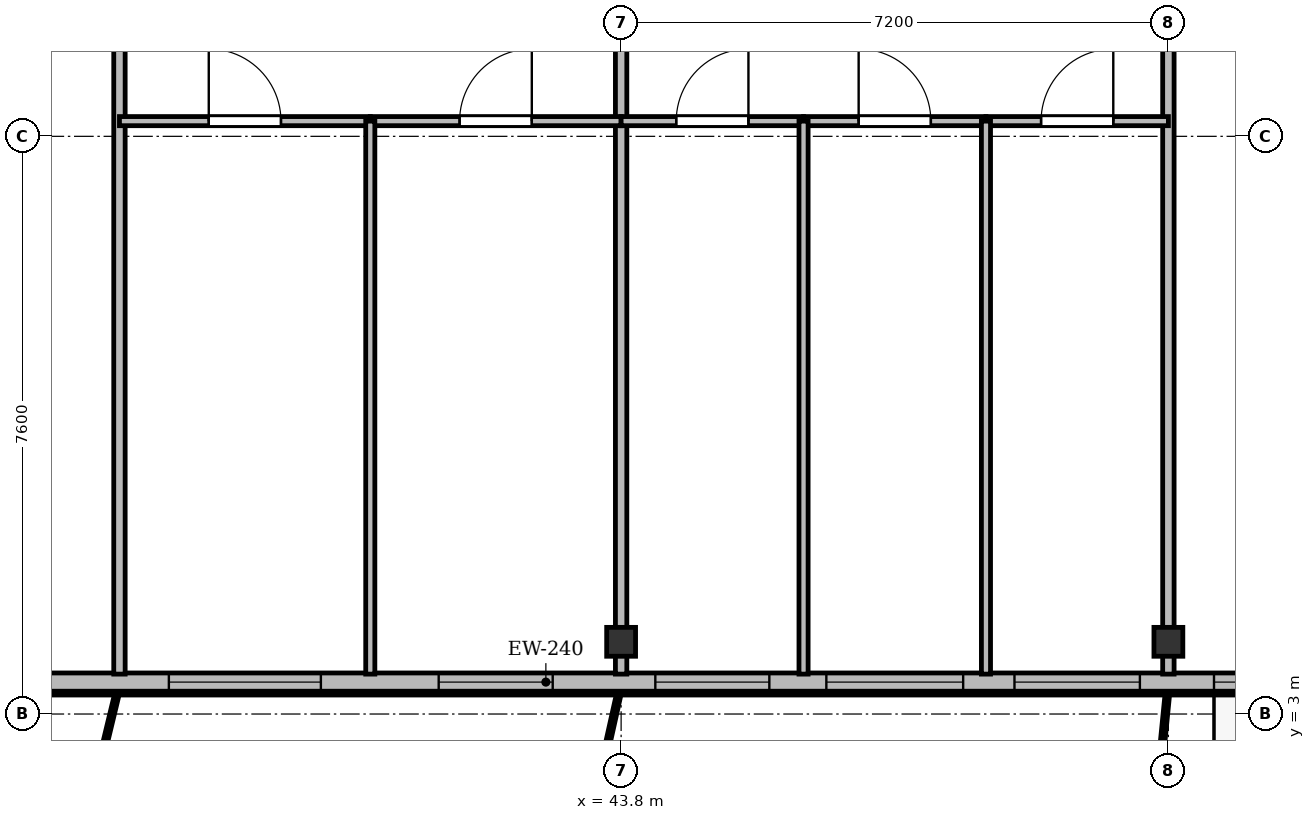
"""IFC4 building model, lengths in metres.
Left out: names, types, materials, properties, quantities, classifications, styles, units other than length and angle.
Written with IfcOpenShell. Run it as: python <this file> out.ifc"""

import sys

from ifc_helpers import new_model, si_unit, direction, frame, frame_2d, origin, origin_2d, place, context, subcontext, project, spatial, rectangle, i_section, extrude, source, transform, mapped, element, fill, save


model = new_model("IFC4")
c1 = context("Model", 3, precision=1e-05, world=origin(), true_north=direction((0.0, 1.0)))
c2 = subcontext(c1, "Body", "Model", "MODEL_VIEW")
j1 = project(units=[si_unit("LENGTHUNIT", "METRE"), si_unit("PLANEANGLEUNIT", "RADIAN")], contexts=[c1])
p1 = place(None, origin())
s1 = spatial("IfcSite", under=j1, at=p1, CompositionType="ELEMENT")
p2 = place(p1, origin())
s2 = spatial("IfcBuilding", under=s1, at=p2, CompositionType="ELEMENT")
p3 = place(p2, frame((0.0, 0.0, 132.1)))
s3 = spatial("IfcBuildingStorey", under=s2, at=p3, CompositionType="ELEMENT", Elevation=132.1)
m1 = source(origin(), c2, "Body", "SweptSolid", [
    extrude(i_section(OverallWidth=0.38, OverallDepth=0.38, WebThickness=0.02, FlangeThickness=0.03, at=origin_2d()), origin(), (0.0, 0.0, 1.0), 3.6),
])
for number, where, z_axis, x_axis in (
    (1, (43.8, 3.95, 0.0), (0.0, 0.0, 1.0), (1.0, 0.0, 0.0)),
    (2, (51.0, 3.95, 0.0), (0.0, 0.0, 1.0), (1.0, 0.0, 0.0)),
):
    element("IfcColumn", number, at=place(p3, frame(where, z_axis=z_axis, x_axis=x_axis)), inside=s3, PredefinedType="COLUMN", context=c2, shape_type="MappedRepresentation", body=[
        mapped(m1, transform((0.0, 0.0, 0.0), x_axis=(1.0, 0.0, 0.0), y_axis=(0.0, 1.0, 0.0), z_axis=(0.0, 0.0, 1.0), scale=1.0)),
    ])
p4 = place(p3, frame((63.6, 3.42, 0.0), z_axis=(0.0, 0.0, 1.0), x_axis=(-1.0, 0.0, 0.0)))
e3 = element("IfcWall", 3, at=p4, inside=s3, PredefinedType="SOLIDWALL", context=c2, shape_type="SweptSolid", body=[
    extrude(rectangle(XDim=52.8, YDim=0.24, at=frame_2d((26.4, 0.0))), origin(), (0.0, 0.0, 1.0), 3.35),
])
p5 = place(p4, frame((0.42, 0.0, 0.9)))
e4 = element("IfcOpeningElement", 4, at=p5, cuts=e3, PredefinedType="OPENING", context=c2, shape_type="SweptSolid", body=[
    extrude(rectangle(XDim=1.65, YDim=1.85, at=frame_2d((0.825, 0.925))), frame((0.0, 0.13, 0.0), z_axis=(0.0, -1.0, 0.0), x_axis=(1.0, 0.0, 0.0)), (0.0, 0.0, 1.0), 0.26),
])
p6 = place(p4, frame((2.75, 0.0, 0.9)))
e5 = element("IfcOpeningElement", 5, at=p6, cuts=e3, PredefinedType="OPENING", context=c2, shape_type="SweptSolid", body=[
    extrude(rectangle(XDim=1.8, YDim=1.8, at=frame_2d((0.9, 0.9))), frame((0.0, 0.13, 0.0), z_axis=(0.0, -1.0, 0.0), x_axis=(1.0, 0.0, 0.0)), (0.0, 0.0, 1.0), 0.26),
])
p7 = place(p4, frame((5.902, 0.0, 0.0)))
e6 = element("IfcOpeningElement", 6, at=p7, cuts=e3, PredefinedType="OPENING", context=c2, shape_type="SweptSolid", body=[
    extrude(rectangle(XDim=1.2, YDim=2.2, at=frame_2d((0.6, 1.1))), frame((0.0, 0.13, 0.0), z_axis=(0.0, -1.0, 0.0), x_axis=(1.0, 0.0, 0.0)), (0.0, 0.0, 1.0), 0.26),
])
p8 = place(p4, frame((7.65, 0.0, 0.9)))
e7 = element("IfcOpeningElement", 7, at=p8, cuts=e3, PredefinedType="OPENING", context=c2, shape_type="SweptSolid", body=[
    extrude(rectangle(XDim=1.5, YDim=1.75, at=frame_2d((0.75, 0.875))), frame((0.0, 0.13, 0.0), z_axis=(0.0, -1.0, 0.0), x_axis=(1.0, 0.0, 0.0)), (0.0, 0.0, 1.0), 0.26),
])
p9 = place(p4, frame((10.0, 0.0, 0.9)))
e8 = element("IfcOpeningElement", 8, at=p9, cuts=e3, PredefinedType="OPENING", context=c2, shape_type="SweptSolid", body=[
    extrude(rectangle(XDim=2.0, YDim=1.95, at=frame_2d((1.0, 0.975))), frame((0.0, 0.13, 0.0), z_axis=(0.0, -1.0, 0.0), x_axis=(1.0, 0.0, 0.0)), (0.0, 0.0, 1.0), 0.26),
])
p10 = place(p4, frame((12.975, 0.0, 0.9)))
e9 = element("IfcOpeningElement", 9, at=p10, cuts=e3, PredefinedType="OPENING", context=c2, shape_type="SweptSolid", body=[
    extrude(rectangle(XDim=1.65, YDim=1.85, at=frame_2d((0.825, 0.925))), frame((0.0, 0.13, 0.0), z_axis=(0.0, -1.0, 0.0), x_axis=(1.0, 0.0, 0.0)), (0.0, 0.0, 1.0), 0.26),
])
p11 = place(p4, frame((15.3, 0.0, 0.9)))
e10 = element("IfcOpeningElement", 10, at=p11, cuts=e3, PredefinedType="OPENING", context=c2, shape_type="SweptSolid", body=[
    extrude(rectangle(XDim=1.8, YDim=1.8, at=frame_2d((0.9, 0.9))), frame((0.0, 0.13, 0.0), z_axis=(0.0, -1.0, 0.0), x_axis=(1.0, 0.0, 0.0)), (0.0, 0.0, 1.0), 0.26),
])
p12 = place(p4, frame((17.85, 0.0, 0.9)))
e11 = element("IfcOpeningElement", 11, at=p12, cuts=e3, PredefinedType="OPENING", context=c2, shape_type="SweptSolid", body=[
    extrude(rectangle(XDim=1.5, YDim=1.75, at=frame_2d((0.75, 0.875))), frame((0.0, 0.13, 0.0), z_axis=(0.0, -1.0, 0.0), x_axis=(1.0, 0.0, 0.0)), (0.0, 0.0, 1.0), 0.26),
])
p13 = place(p4, frame((20.7, 0.0, 0.9)))
e12 = element("IfcOpeningElement", 12, at=p13, cuts=e3, PredefinedType="OPENING", context=c2, shape_type="SweptSolid", body=[
    extrude(rectangle(XDim=1.5, YDim=1.75, at=frame_2d((0.75, 0.875))), frame((0.0, 0.13, 0.0), z_axis=(0.0, -1.0, 0.0), x_axis=(1.0, 0.0, 0.0)), (0.0, 0.0, 1.0), 0.26),
])
p14 = place(p4, frame((23.75, 0.0, 0.9)))
e13 = element("IfcOpeningElement", 13, at=p14, cuts=e3, PredefinedType="OPENING", context=c2, shape_type="SweptSolid", body=[
    extrude(rectangle(XDim=2.0, YDim=1.95, at=frame_2d((1.0, 0.975))), frame((0.0, 0.13, 0.0), z_axis=(0.0, -1.0, 0.0), x_axis=(1.0, 0.0, 0.0)), (0.0, 0.0, 1.0), 0.26),
])
p15 = place(p4, frame((28.875, 0.0, 0.9)))
e14 = element("IfcOpeningElement", 14, at=p15, cuts=e3, PredefinedType="OPENING", context=c2, shape_type="SweptSolid", body=[
    extrude(rectangle(XDim=1.65, YDim=1.85, at=frame_2d((0.825, 0.925))), frame((0.0, 0.13, 0.0), z_axis=(0.0, -1.0, 0.0), x_axis=(1.0, 0.0, 0.0)), (0.0, 0.0, 1.0), 0.26),
])
p16 = place(p4, frame((34.478, 0.0, 0.0)))
e15 = element("IfcOpeningElement", 15, at=p16, cuts=e3, PredefinedType="OPENING", context=c2, shape_type="SweptSolid", body=[
    extrude(rectangle(XDim=1.2, YDim=2.2, at=frame_2d((0.6, 1.1))), frame((0.0, 0.13, 0.0), z_axis=(0.0, -1.0, 0.0), x_axis=(1.0, 0.0, 0.0)), (0.0, 0.0, 1.0), 0.26),
])
p17 = place(p4, frame((37.3, 0.0, 0.9)))
e16 = element("IfcOpeningElement", 16, at=p17, cuts=e3, PredefinedType="OPENING", context=c2, shape_type="SweptSolid", body=[
    extrude(rectangle(XDim=2.2, YDim=1.8, at=frame_2d((1.1, 0.9))), frame((0.0, 0.13, 0.0), z_axis=(0.0, -1.0, 0.0), x_axis=(1.0, 0.0, 0.0)), (0.0, 0.0, 1.0), 0.26),
])
p18 = place(p4, frame((41.05, 0.0, 0.9)))
e17 = element("IfcOpeningElement", 17, at=p18, cuts=e3, PredefinedType="OPENING", context=c2, shape_type="SweptSolid", body=[
    extrude(rectangle(XDim=1.5, YDim=1.75, at=frame_2d((0.75, 0.875))), frame((0.0, 0.13, 0.0), z_axis=(0.0, -1.0, 0.0), x_axis=(1.0, 0.0, 0.0)), (0.0, 0.0, 1.0), 0.26),
])
p19 = place(p4, frame((43.65, 0.0, 0.9)))
e18 = element("IfcOpeningElement", 18, at=p19, cuts=e3, PredefinedType="OPENING", context=c2, shape_type="SweptSolid", body=[
    extrude(rectangle(XDim=1.5, YDim=1.75, at=frame_2d((0.75, 0.875))), frame((0.0, 0.13, 0.0), z_axis=(0.0, -1.0, 0.0), x_axis=(1.0, 0.0, 0.0)), (0.0, 0.0, 1.0), 0.26),
])
p20 = place(p4, frame((45.775, 0.0, 0.9)))
e19 = element("IfcOpeningElement", 19, at=p20, cuts=e3, PredefinedType="OPENING", context=c2, shape_type="SweptSolid", body=[
    extrude(rectangle(XDim=1.65, YDim=1.85, at=frame_2d((0.825, 0.925))), frame((0.0, 0.13, 0.0), z_axis=(0.0, -1.0, 0.0), x_axis=(1.0, 0.0, 0.0)), (0.0, 0.0, 1.0), 0.26),
])
p21 = place(p4, frame((48.1, 0.0, 0.9)))
e20 = element("IfcOpeningElement", 20, at=p21, cuts=e3, PredefinedType="OPENING", context=c2, shape_type="SweptSolid", body=[
    extrude(rectangle(XDim=1.8, YDim=1.8, at=frame_2d((0.9, 0.9))), frame((0.0, 0.13, 0.0), z_axis=(0.0, -1.0, 0.0), x_axis=(1.0, 0.0, 0.0)), (0.0, 0.0, 1.0), 0.26),
])
p22 = place(p4, frame((50.705, 0.0, 0.9)))
e21 = element("IfcOpeningElement", 21, at=p22, cuts=e3, PredefinedType="OPENING", context=c2, shape_type="SweptSolid", body=[
    extrude(rectangle(XDim=1.5, YDim=1.75, at=frame_2d((0.75, 0.875))), frame((0.0, 0.13, 0.0), z_axis=(0.0, -1.0, 0.0), x_axis=(1.0, 0.0, 0.0)), (0.0, 0.0, 1.0), 0.26),
])
p23 = place(p3, frame((37.2, 3.525, 0.0), z_axis=(0.0, 0.0, 1.0), x_axis=(0.0, 1.0, 0.0)))
e22 = element("IfcWall", 22, at=p23, inside=s3, PredefinedType="PARTITIONING", context=c2, shape_type="SweptSolid", body=[
    extrude(rectangle(XDim=27.275, YDim=0.15, at=frame_2d((13.638, 0.0))), origin(), (0.0, 0.0, 1.0), 2.75),
])
for number, where, z_axis, x_axis in (
    (23, (43.8, 3.525, 0.0), (0.0, 0.0, 1.0), (0.0, 1.0, 0.0)),
    (24, (51.0, 3.525, 0.0), (0.0, 0.0, 1.0), (0.0, 1.0, 0.0)),
):
    element("IfcWall", number, at=place(p3, frame(where, z_axis=z_axis, x_axis=x_axis)), inside=s3, PredefinedType="PARTITIONING", context=c2, shape_type="SweptSolid", body=[
        extrude(rectangle(XDim=27.275, YDim=0.15, at=frame_2d((13.638, 0.0))), origin(), (0.0, 0.0, 1.0), 2.85),
    ])
p24 = place(p3, frame((37.2, 10.8, 0.0), z_axis=(0.0, 0.0, 1.0), x_axis=(1.0, 0.0, 0.0)))
e25 = element("IfcWall", 25, at=p24, inside=s3, PredefinedType="PARTITIONING", context=c2, shape_type="SweptSolid", body=[
    extrude(rectangle(XDim=3.3, YDim=0.12, at=frame_2d((1.65, 0.0))), origin(), (0.0, 0.0, 1.0), 3.0),
])
p25 = place(p24, frame((1.175, 0.0, 0.0)))
e26 = element("IfcOpeningElement", 26, at=p25, cuts=e25, PredefinedType="OPENING", context=c2, shape_type="SweptSolid", body=[
    extrude(rectangle(XDim=0.95, YDim=2.15, at=frame_2d((0.475, 1.075))), frame((0.0, 0.07, 0.0), z_axis=(0.0, -1.0, 0.0), x_axis=(1.0, 0.0, 0.0)), (0.0, 0.0, 1.0), 0.14),
])
p26 = place(p3, frame((40.5, 10.8, 0.0), z_axis=(0.0, 0.0, 1.0), x_axis=(1.0, 0.0, 0.0)))
e27 = element("IfcWall", 27, at=p26, inside=s3, PredefinedType="PARTITIONING", context=c2, shape_type="SweptSolid", body=[
    extrude(rectangle(XDim=3.3, YDim=0.12, at=frame_2d((1.65, 0.0))), origin(), (0.0, 0.0, 1.0), 2.85),
])
p27 = place(p26, frame((1.175, 0.0, 0.0)))
e28 = element("IfcOpeningElement", 28, at=p27, cuts=e27, PredefinedType="OPENING", context=c2, shape_type="SweptSolid", body=[
    extrude(rectangle(XDim=0.95, YDim=2.15, at=frame_2d((0.475, 1.075))), frame((0.0, 0.07, 0.0), z_axis=(0.0, -1.0, 0.0), x_axis=(1.0, 0.0, 0.0)), (0.0, 0.0, 1.0), 0.14),
])
p28 = place(p3, frame((40.5, 3.525, 0.0), z_axis=(0.0, 0.0, 1.0), x_axis=(0.0, 1.0, 0.0)))
e29 = element("IfcWall", 29, at=p28, inside=s3, PredefinedType="PARTITIONING", context=c2, shape_type="SweptSolid", body=[
    extrude(rectangle(XDim=7.275, YDim=0.12, at=frame_2d((3.638, 0.0))), origin(), (0.0, 0.0, 1.0), 2.75),
])
p29 = place(p3, frame((43.8, 10.8, 0.0), z_axis=(0.0, 0.0, 1.0), x_axis=(1.0, 0.0, 0.0)))
e30 = element("IfcWall", 30, at=p29, inside=s3, PredefinedType="PARTITIONING", context=c2, shape_type="SweptSolid", body=[
    extrude(rectangle(XDim=2.4, YDim=0.12, at=frame_2d((1.2, 0.0))), origin(), (0.0, 0.0, 1.0), 2.85),
])
p30 = place(p29, frame((0.725, 0.0, 0.0)))
e31 = element("IfcOpeningElement", 31, at=p30, cuts=e30, PredefinedType="OPENING", context=c2, shape_type="SweptSolid", body=[
    extrude(rectangle(XDim=0.95, YDim=2.15, at=frame_2d((0.475, 1.075))), frame((0.0, 0.07, 0.0), z_axis=(0.0, -1.0, 0.0), x_axis=(1.0, 0.0, 0.0)), (0.0, 0.0, 1.0), 0.14),
])
p31 = place(p3, frame((46.2, 10.8, 0.0), z_axis=(0.0, 0.0, 1.0), x_axis=(1.0, 0.0, 0.0)))
e32 = element("IfcWall", 32, at=p31, inside=s3, PredefinedType="PARTITIONING", context=c2, shape_type="SweptSolid", body=[
    extrude(rectangle(XDim=2.4, YDim=0.12, at=frame_2d((1.2, 0.0))), origin(), (0.0, 0.0, 1.0), 3.0),
])
p32 = place(p31, frame((0.725, 0.0, 0.0)))
e33 = element("IfcOpeningElement", 33, at=p32, cuts=e32, PredefinedType="OPENING", context=c2, shape_type="SweptSolid", body=[
    extrude(rectangle(XDim=0.95, YDim=2.15, at=frame_2d((0.475, 1.075))), frame((0.0, 0.07, 0.0), z_axis=(0.0, -1.0, 0.0), x_axis=(1.0, 0.0, 0.0)), (0.0, 0.0, 1.0), 0.14),
])
p33 = place(p3, frame((46.2, 3.525, 0.0), z_axis=(0.0, 0.0, 1.0), x_axis=(0.0, 1.0, 0.0)))
e34 = element("IfcWall", 34, at=p33, inside=s3, PredefinedType="PARTITIONING", context=c2, shape_type="SweptSolid", body=[
    extrude(rectangle(XDim=7.275, YDim=0.12, at=frame_2d((3.638, 0.0))), origin(), (0.0, 0.0, 1.0), 2.75),
])
p34 = place(p3, frame((48.6, 10.8, 0.0), z_axis=(0.0, 0.0, 1.0), x_axis=(1.0, 0.0, 0.0)))
e35 = element("IfcWall", 35, at=p34, inside=s3, PredefinedType="PARTITIONING", context=c2, shape_type="SweptSolid", body=[
    extrude(rectangle(XDim=2.4, YDim=0.12, at=frame_2d((1.2, 0.0))), origin(), (0.0, 0.0, 1.0), 2.85),
])
p35 = place(p34, frame((0.725, 0.0, 0.0)))
e36 = element("IfcOpeningElement", 36, at=p35, cuts=e35, PredefinedType="OPENING", context=c2, shape_type="SweptSolid", body=[
    extrude(rectangle(XDim=0.95, YDim=2.15, at=frame_2d((0.475, 1.075))), frame((0.0, 0.07, 0.0), z_axis=(0.0, -1.0, 0.0), x_axis=(1.0, 0.0, 0.0)), (0.0, 0.0, 1.0), 0.14),
])
p36 = place(p3, frame((48.6, 3.525, 0.0), z_axis=(0.0, 0.0, 1.0), x_axis=(0.0, 1.0, 0.0)))
e37 = element("IfcWall", 37, at=p36, inside=s3, PredefinedType="PARTITIONING", context=c2, shape_type="SweptSolid", body=[
    extrude(rectangle(XDim=7.275, YDim=0.12, at=frame_2d((3.638, 0.0))), origin(), (0.0, 0.0, 1.0), 2.75),
])
m2 = source(origin(), c2, "Body", "SweptSolid", [
    extrude(rectangle(XDim=2.0, YDim=1.95, at=frame_2d((1.0, 0.975))), frame((0.0, 0.03, 0.0), z_axis=(0.0, -1.0, 0.0), x_axis=(1.0, 0.0, 0.0)), (0.0, 0.0, 1.0), 0.06),
])
p37 = place(p9, origin())
e38 = element("IfcWindow", 38, at=p37, inside=s3, PartitioningType="SINGLE_PANEL", PredefinedType="WINDOW", context=c2, shape_type="MappedRepresentation", body=[
    mapped(m2, transform((0.0, 0.0, 0.0), x_axis=(1.0, 0.0, 0.0), y_axis=(0.0, 1.0, 0.0), z_axis=(0.0, 0.0, 1.0), scale=1.0)),
])
fill(e8, e38)
m3 = source(origin(), c2, "Body", "SweptSolid", [
    extrude(rectangle(XDim=1.65, YDim=1.85, at=frame_2d((0.825, 0.925))), frame((0.0, 0.03, 0.0), z_axis=(0.0, -1.0, 0.0), x_axis=(1.0, 0.0, 0.0)), (0.0, 0.0, 1.0), 0.06),
])
p38 = place(p10, origin())
e39 = element("IfcWindow", 39, at=p38, inside=s3, PartitioningType="SINGLE_PANEL", PredefinedType="WINDOW", context=c2, shape_type="MappedRepresentation", body=[
    mapped(m3, transform((0.0, 0.0, 0.0), x_axis=(1.0, 0.0, 0.0), y_axis=(0.0, 1.0, 0.0), z_axis=(0.0, 0.0, 1.0), scale=1.0)),
])
fill(e9, e39)
m4 = source(origin(), c2, "Body", "SweptSolid", [
    extrude(rectangle(XDim=1.8, YDim=1.8, at=frame_2d((0.9, 0.9))), frame((0.0, 0.03, 0.0), z_axis=(0.0, -1.0, 0.0), x_axis=(1.0, 0.0, 0.0)), (0.0, 0.0, 1.0), 0.06),
])
p39 = place(p11, origin())
e40 = element("IfcWindow", 40, at=p39, inside=s3, PartitioningType="SINGLE_PANEL", PredefinedType="WINDOW", context=c2, shape_type="MappedRepresentation", body=[
    mapped(m4, transform((0.0, 0.0, 0.0), x_axis=(1.0, 0.0, 0.0), y_axis=(0.0, 1.0, 0.0), z_axis=(0.0, 0.0, 1.0), scale=1.0)),
])
fill(e10, e40)
m5 = source(origin(), c2, "Body", "SweptSolid", [
    extrude(rectangle(XDim=1.5, YDim=1.75, at=frame_2d((0.75, 0.875))), frame((0.0, 0.03, 0.0), z_axis=(0.0, -1.0, 0.0), x_axis=(1.0, 0.0, 0.0)), (0.0, 0.0, 1.0), 0.06),
])
p40 = place(p12, origin())
e41 = element("IfcWindow", 41, at=p40, inside=s3, PartitioningType="SINGLE_PANEL", PredefinedType="WINDOW", context=c2, shape_type="MappedRepresentation", body=[
    mapped(m5, transform((0.0, 0.0, 0.0), x_axis=(1.0, 0.0, 0.0), y_axis=(0.0, 1.0, 0.0), z_axis=(0.0, 0.0, 1.0), scale=1.0)),
])
fill(e11, e41)
p41 = place(p13, origin())
e42 = element("IfcWindow", 42, at=p41, inside=s3, PartitioningType="SINGLE_PANEL", PredefinedType="WINDOW", context=c2, shape_type="MappedRepresentation", body=[
    mapped(m5, transform((0.0, 0.0, 0.0), x_axis=(1.0, 0.0, 0.0), y_axis=(0.0, 1.0, 0.0), z_axis=(0.0, 0.0, 1.0), scale=1.0)),
])
fill(e12, e42)
p42 = place(p14, origin())
e43 = element("IfcWindow", 43, at=p42, inside=s3, PartitioningType="SINGLE_PANEL", PredefinedType="WINDOW", context=c2, shape_type="MappedRepresentation", body=[
    mapped(m2, transform((0.0, 0.0, 0.0), x_axis=(1.0, 0.0, 0.0), y_axis=(0.0, 1.0, 0.0), z_axis=(0.0, 0.0, 1.0), scale=1.0)),
])
fill(e13, e43)
m6 = source(origin(), c2, "Body", "SweptSolid", [
    extrude(rectangle(XDim=0.95, YDim=2.15, at=frame_2d((0.475, 1.075))), frame((0.0, 0.025, 0.0), z_axis=(0.0, -1.0, 0.0), x_axis=(1.0, 0.0, 0.0)), (0.0, 0.0, 1.0), 0.05),
])
p43 = place(p25, origin())
e44 = element("IfcDoor", 44, at=p43, inside=s3, OperationType="SINGLE_SWING_LEFT", PredefinedType="DOOR", context=c2, shape_type="MappedRepresentation", body=[
    mapped(m6, transform((0.0, 0.0, 0.0), x_axis=(1.0, 0.0, 0.0), y_axis=(0.0, 1.0, 0.0), z_axis=(0.0, 0.0, 1.0), scale=1.0)),
])
fill(e26, e44)
p44 = place(p27, origin())
e45 = element("IfcDoor", 45, at=p44, inside=s3, OperationType="SINGLE_SWING_RIGHT", PredefinedType="DOOR", context=c2, shape_type="MappedRepresentation", body=[
    mapped(m6, transform((0.0, 0.0, 0.0), x_axis=(1.0, 0.0, 0.0), y_axis=(0.0, 1.0, 0.0), z_axis=(0.0, 0.0, 1.0), scale=1.0)),
])
fill(e28, e45)
p45 = place(p30, origin())
e46 = element("IfcDoor", 46, at=p45, inside=s3, OperationType="SINGLE_SWING_RIGHT", PredefinedType="DOOR", context=c2, shape_type="MappedRepresentation", body=[
    mapped(m6, transform((0.0, 0.0, 0.0), x_axis=(1.0, 0.0, 0.0), y_axis=(0.0, 1.0, 0.0), z_axis=(0.0, 0.0, 1.0), scale=1.0)),
])
fill(e31, e46)
p46 = place(p32, origin())
e47 = element("IfcDoor", 47, at=p46, inside=s3, OperationType="SINGLE_SWING_LEFT", PredefinedType="DOOR", context=c2, shape_type="MappedRepresentation", body=[
    mapped(m6, transform((0.0, 0.0, 0.0), x_axis=(1.0, 0.0, 0.0), y_axis=(0.0, 1.0, 0.0), z_axis=(0.0, 0.0, 1.0), scale=1.0)),
])
fill(e33, e47)
p47 = place(p35, origin())
e48 = element("IfcDoor", 48, at=p47, inside=s3, OperationType="SINGLE_SWING_RIGHT", PredefinedType="DOOR", context=c2, shape_type="MappedRepresentation", body=[
    mapped(m6, transform((0.0, 0.0, 0.0), x_axis=(1.0, 0.0, 0.0), y_axis=(0.0, 1.0, 0.0), z_axis=(0.0, 0.0, 1.0), scale=1.0)),
])
fill(e36, e48)
save(model, sys.argv[1])
